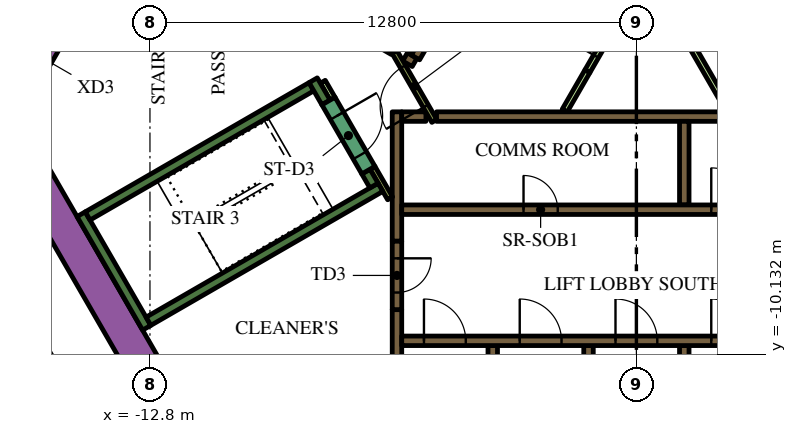
"""IFC4 building model, lengths in metres.
Left out: names, types, materials, properties, quantities, classifications, styles, units other than length and angle.
Written with IfcOpenShell. Run it as: python <this file> out.ifc"""

import sys

from ifc_helpers import new_model, si_unit, direction, frame, frame_2d, origin, place, context, subcontext, project, spatial, rectangle, extrude, element, fill, save


model = new_model("IFC4")
c1 = context("Model", 3, precision=1e-05, world=origin(), true_north=direction((0.0, 1.0)))
c2 = subcontext(c1, "Body", "Model", "MODEL_VIEW")
j1 = project(units=[si_unit("LENGTHUNIT", "METRE"), si_unit("PLANEANGLEUNIT", "RADIAN")], contexts=[c1])
p1 = place(None, origin())
s1 = spatial("IfcSite", under=j1, at=p1, CompositionType="ELEMENT")
p2 = place(p1, origin())
s2 = spatial("IfcBuilding", under=s1, at=p2, CompositionType="ELEMENT")
p3 = place(p2, frame((0.0, 0.0, 51.0)))
s3 = spatial("IfcBuildingStorey", under=s2, at=p3, CompositionType="ELEMENT", Elevation=51.0)
p4 = place(p3, frame((-12.134, -11.883, 0.0), z_axis=(0.0, 0.0, 1.0), x_axis=(-0.500005339912, 0.866022320763, 0.0)))
e1 = element("IfcWall", 1, at=p4, inside=s3, PredefinedType="SOLIDWALL", context=c2, shape_type="SweptSolid", body=[
    extrude(rectangle(XDim=9.488, YDim=0.9, at=frame_2d((4.744, 0.0))), origin(), (0.0, 0.0, 1.0), 3.9),
])
p5 = place(p3, frame((-12.885, -9.431, 0.0), z_axis=(0.0, 0.0, 1.0), x_axis=(-0.500020560727, 0.866013532718, 0.0)))
e2 = element("IfcWall", 2, at=p5, inside=s3, PredefinedType="SOLIDWALL", context=c2, shape_type="SweptSolid", body=[
    extrude(rectangle(XDim=3.45, YDim=0.25, at=frame_2d((1.725, 0.0))), origin(), (0.0, 0.0, 1.0), 3.9),
])
p6 = place(p3, frame((-14.44, -6.49, 0.0), z_axis=(0.0, 0.0, 1.0), x_axis=(0.866022966069, 0.500004222222, 0.0)))
e3 = element("IfcWall", 3, at=p6, inside=s3, PredefinedType="SOLIDWALL", context=c2, shape_type="SweptSolid", body=[
    extrude(rectangle(XDim=6.8, YDim=0.25, at=frame_2d((3.4, 0.0))), origin(), (0.0, 0.0, 1.0), 3.9),
])
p7 = place(p3, frame((-8.168, -3.503, 0.0), z_axis=(0.0, 0.0, 1.0), x_axis=(-0.499952099219, 0.866053057547, 0.0)))
e4 = element("IfcWall", 4, at=p7, inside=s3, PredefinedType="SOLIDWALL", context=c2, shape_type="SweptSolid", body=[
    extrude(rectangle(XDim=0.675, YDim=0.25, at=frame_2d((0.337, 0.0))), origin(), (0.0, 0.0, 1.0), 3.9),
])
p8 = place(p3, frame((-12.84, -9.261, 0.0), z_axis=(0.0, 0.0, 1.0), x_axis=(0.866016039709, 0.500016218704, 0.0)))
e5 = element("IfcWall", 5, at=p8, inside=s3, PredefinedType="SOLIDWALL", context=c2, shape_type="SweptSolid", body=[
    extrude(rectangle(XDim=7.05, YDim=0.25, at=frame_2d((3.525, 0.0))), origin(), (0.0, 0.0, 1.0), 3.9),
])
p9 = place(p3, frame((-6.905, -5.69, 0.0), z_axis=(0.0, 0.0, 1.0), x_axis=(-0.500402024738, 0.865793170242, 0.0)))
e6 = element("IfcWall", 6, at=p9, inside=s3, PredefinedType="SOLIDWALL", context=c2, shape_type="SweptSolid", body=[
    extrude(rectangle(XDim=0.425, YDim=0.25, at=frame_2d((0.212, 0.0))), origin(), (0.0, 0.0, 1.0), 3.9),
])
p10 = place(p3, frame((-3.78, -12.1, 0.0), z_axis=(0.0, 0.0, 1.0), x_axis=(0.0, 1.0, 0.0)))
e7 = element("IfcWall", 7, at=p10, inside=s3, PredefinedType="SOLIDWALL", context=c2, shape_type="SweptSolid", body=[
    extrude(rectangle(XDim=2.2, YDim=0.25, at=frame_2d((1.1, 0.0))), origin(), (0.0, 0.0, 1.0), 3.9),
])
p11 = place(p3, frame((-6.3, -12.1, 0.0), z_axis=(0.0, 0.0, 1.0), x_axis=(0.0, 1.0, 0.0)))
e8 = element("IfcWall", 8, at=p11, inside=s3, PredefinedType="SOLIDWALL", context=c2, shape_type="SweptSolid", body=[
    extrude(rectangle(XDim=3.146, YDim=0.25, at=frame_2d((1.573, 0.0))), origin(), (0.0, 0.0, 1.0), 3.9),
])
p12 = place(p3, frame((-5.259, -3.875, 0.0), z_axis=(0.0, 0.0, 1.0), x_axis=(1.0, 0.0, 0.0)))
e9 = element("IfcWall", 9, at=p12, inside=s3, PredefinedType="SOLIDWALL", context=c2, shape_type="SweptSolid", body=[
    extrude(rectangle(XDim=10.489, YDim=0.25, at=frame_2d((5.244, 0.0))), origin(), (0.0, 0.0, 1.0), 3.9),
])
p13 = place(p3, frame((1.26, -4.0, 0.0), z_axis=(0.0, 0.0, 1.0), x_axis=(0.0, -1.0, 0.0)))
e10 = element("IfcWall", 10, at=p13, inside=s3, PredefinedType="SOLIDWALL", context=c2, shape_type="SweptSolid", body=[
    extrude(rectangle(XDim=2.2, YDim=0.25, at=frame_2d((1.1, 0.0))), origin(), (0.0, 0.0, 1.0), 3.9),
])
p14 = place(p3, frame((-6.3, -3.75, 0.0), z_axis=(0.0, 0.0, 1.0), x_axis=(0.0, -1.0, 0.0)))
e11 = element("IfcWall", 11, at=p14, inside=s3, PredefinedType="SOLIDWALL", context=c2, shape_type="SweptSolid", body=[
    extrude(rectangle(XDim=3.404, YDim=0.25, at=frame_2d((1.702, 0.0))), origin(), (0.0, 0.0, 1.0), 3.9),
])
p15 = place(p3, frame((-6.175, -3.875, 0.0), z_axis=(0.0, 0.0, 1.0), x_axis=(1.0, 0.0, 0.0)))
e12 = element("IfcWall", 12, at=p15, inside=s3, PredefinedType="SOLIDWALL", context=c2, shape_type="SweptSolid", body=[
    extrude(rectangle(XDim=0.637, YDim=0.25, at=frame_2d((0.318, 0.0))), origin(), (0.0, 0.0, 1.0), 3.9),
])
for number, where, z_axis, x_axis in (
    (13, (1.26, -12.1, 0.0), (0.0, 0.0, 1.0), (0.0, 1.0, 0.0)),
    (14, (-1.26, -12.1, 0.0), (0.0, 0.0, 1.0), (0.0, 1.0, 0.0)),
):
    element("IfcWall", number, at=place(p3, frame(where, z_axis=z_axis, x_axis=x_axis)), inside=s3, PredefinedType="SOLIDWALL", context=c2, shape_type="SweptSolid", body=[
        extrude(rectangle(XDim=2.2, YDim=0.25, at=frame_2d((1.1, 0.0))), origin(), (0.0, 0.0, 1.0), 3.9),
    ])
p16 = place(p3, frame((5.97, -2.591, 0.0), z_axis=(0.0, 0.0, 1.0), x_axis=(-0.499994469932, 0.866028596547, 0.0)))
e15 = element("IfcWall", 15, at=p16, inside=s3, PredefinedType="SOLIDWALL", context=c2, shape_type="SweptSolid", body=[
    extrude(rectangle(XDim=10.488, YDim=0.25, at=frame_2d((5.244, 0.0))), origin(), (0.0, 0.0, 1.0), 3.9),
])
p17 = place(p3, frame((-6.088, -2.305, 0.0), z_axis=(0.0, 0.0, 1.0), x_axis=(0.866059450854, -0.499941024108, 0.0)))
e16 = element("IfcWall", 16, at=p17, inside=s3, PredefinedType="SOLIDWALL", context=c2, shape_type="SweptSolid", body=[
    extrude(rectangle(XDim=0.29, YDim=0.25, at=frame_2d((0.145, 0.0))), origin(), (0.0, 0.0, 1.0), 3.9),
])
p18 = place(p3, frame((-7.889, -1.265, 0.0), z_axis=(0.0, 0.0, 1.0), x_axis=(0.865986741702, -0.500066958712, 0.0)))
e17 = element("IfcWall", 17, at=p18, inside=s3, PredefinedType="SOLIDWALL", context=c2, shape_type="SweptSolid", body=[
    extrude(rectangle(XDim=1.738, YDim=0.25, at=frame_2d((0.869, 0.0))), origin(), (0.0, 0.0, 1.0), 3.9),
])
p19 = place(p3, frame((-6.48, -6.027, 0.0), z_axis=(0.0, 0.0, 1.0), x_axis=(-0.499927229454, 0.866067413802, 0.0)))
e18 = element("IfcWall", 18, at=p19, inside=s3, PredefinedType="PARTITIONING", context=c2, shape_type="SweptSolid", body=[
    extrude(rectangle(XDim=0.929, YDim=0.15, at=frame_2d((0.464, 0.0))), origin(), (0.0, 0.0, 1.0), 3.9),
])
p20 = place(p3, frame((-1.887, -3.718, 0.0), z_axis=(0.0, 0.0, 1.0), x_axis=(0.500057179532, 0.865992388649, 0.0)))
e19 = element("IfcWall", 19, at=p20, inside=s3, PredefinedType="PARTITIONING", context=c2, shape_type="SweptSolid", body=[
    extrude(rectangle(XDim=1.199, YDim=0.15, at=frame_2d((0.6, 0.0))), origin(), (0.0, 0.0, 1.0), 2.75),
])
p21 = place(p3, frame((-8.252, -2.958, 0.0), z_axis=(0.0, 0.0, 1.0), x_axis=(0.500174715838, -0.865924508047, 0.0)))
e20 = element("IfcWall", 20, at=p21, inside=s3, PredefinedType="PARTITIONING", context=c2, shape_type="SweptSolid", body=[
    extrude(rectangle(XDim=0.514, YDim=0.15, at=frame_2d((0.257, 0.0))), origin(), (0.0, 0.0, 1.0), 2.75),
])
p22 = place(p3, frame((2.435, -3.718, 0.0), z_axis=(0.0, 0.0, 1.0), x_axis=(-0.499985176046, 0.866033962229, 0.0)))
e21 = element("IfcWall", 21, at=p22, inside=s3, PredefinedType="PARTITIONING", context=c2, shape_type="SweptSolid", body=[
    extrude(rectangle(XDim=8.875, YDim=0.15, at=frame_2d((4.438, 0.0))), origin(), (0.0, 0.0, 1.0), 2.75),
])
p23 = place(p3, frame((-6.175, -9.775, 0.0), z_axis=(0.0, 0.0, 1.0), x_axis=(1.0, 0.0, 0.0)))
e22 = element("IfcWall", 22, at=p23, inside=s3, PredefinedType="SOLIDWALL", context=c2, shape_type="SweptSolid", body=[
    extrude(rectangle(XDim=12.35, YDim=0.25, at=frame_2d((6.175, 0.0))), origin(), (0.0, 0.0, 1.0), 3.9),
])
p24 = place(p23, frame((0.585, 0.0, 0.0)))
e23 = element("IfcOpeningElement", 23, at=p24, cuts=e22, PredefinedType="OPENING", context=c2, shape_type="SweptSolid", body=[
    extrude(rectangle(XDim=1.1, YDim=2.1, at=frame_2d((0.55, 1.05))), frame((0.0, 0.135, 0.0), z_axis=(0.0, -1.0, 0.0), x_axis=(1.0, 0.0, 0.0)), (0.0, 0.0, 1.0), 0.27),
])
p25 = place(p23, frame((3.105, 0.0, 0.0)))
e24 = element("IfcOpeningElement", 24, at=p25, cuts=e22, PredefinedType="OPENING", context=c2, shape_type="SweptSolid", body=[
    extrude(rectangle(XDim=1.1, YDim=2.1, at=frame_2d((0.55, 1.05))), frame((0.0, 0.135, 0.0), z_axis=(0.0, -1.0, 0.0), x_axis=(1.0, 0.0, 0.0)), (0.0, 0.0, 1.0), 0.27),
])
p26 = place(p23, frame((5.625, 0.0, 0.0)))
e25 = element("IfcOpeningElement", 25, at=p26, cuts=e22, PredefinedType="OPENING", context=c2, shape_type="SweptSolid", body=[
    extrude(rectangle(XDim=1.1, YDim=2.1, at=frame_2d((0.55, 1.05))), frame((0.0, 0.135, 0.0), z_axis=(0.0, -1.0, 0.0), x_axis=(1.0, 0.0, 0.0)), (0.0, 0.0, 1.0), 0.27),
])
p27 = place(p23, frame((8.145, 0.0, 0.0)))
e26 = element("IfcOpeningElement", 26, at=p27, cuts=e22, PredefinedType="OPENING", context=c2, shape_type="SweptSolid", body=[
    extrude(rectangle(XDim=1.1, YDim=2.1, at=frame_2d((0.55, 1.05))), frame((0.0, 0.135, 0.0), z_axis=(0.0, -1.0, 0.0), x_axis=(1.0, 0.0, 0.0)), (0.0, 0.0, 1.0), 0.27),
])
p28 = place(p23, frame((10.665, 0.0, 0.0)))
e27 = element("IfcOpeningElement", 27, at=p28, cuts=e22, PredefinedType="OPENING", context=c2, shape_type="SweptSolid", body=[
    extrude(rectangle(XDim=1.1, YDim=2.1, at=frame_2d((0.55, 1.05))), frame((0.0, 0.135, 0.0), z_axis=(0.0, -1.0, 0.0), x_axis=(1.0, 0.0, 0.0)), (0.0, 0.0, 1.0), 0.27),
])
p29 = place(p3, frame((-6.175, -6.325, 0.0), z_axis=(0.0, 0.0, 1.0), x_axis=(1.0, 0.0, 0.0)))
e28 = element("IfcWall", 28, at=p29, inside=s3, PredefinedType="SOLIDWALL", context=c2, shape_type="SweptSolid", body=[
    extrude(rectangle(XDim=12.35, YDim=0.25, at=frame_2d((6.175, 0.0))), origin(), (0.0, 0.0, 1.0), 3.9),
])
p30 = place(p29, frame((3.205, 0.0, 0.0)))
e29 = element("IfcOpeningElement", 29, at=p30, cuts=e28, PredefinedType="OPENING", context=c2, shape_type="SweptSolid", body=[
    extrude(rectangle(XDim=0.9, YDim=2.1, at=frame_2d((0.45, 1.05))), frame((0.0, 0.135, 0.0), z_axis=(0.0, -1.0, 0.0), x_axis=(1.0, 0.0, 0.0)), (0.0, 0.0, 1.0), 0.27),
])
p31 = place(p29, frame((8.145, 0.0, 0.0)))
e30 = element("IfcOpeningElement", 30, at=p31, cuts=e28, PredefinedType="OPENING", context=c2, shape_type="SweptSolid", body=[
    extrude(rectangle(XDim=1.1, YDim=2.1, at=frame_2d((0.55, 1.05))), frame((0.0, 0.135, 0.0), z_axis=(0.0, -1.0, 0.0), x_axis=(1.0, 0.0, 0.0)), (0.0, 0.0, 1.0), 0.27),
])
p32 = place(p29, frame((10.665, 0.0, 0.0)))
e31 = element("IfcOpeningElement", 31, at=p32, cuts=e28, PredefinedType="OPENING", context=c2, shape_type="SweptSolid", body=[
    extrude(rectangle(XDim=1.1, YDim=2.1, at=frame_2d((0.55, 1.05))), frame((0.0, 0.135, 0.0), z_axis=(0.0, -1.0, 0.0), x_axis=(1.0, 0.0, 0.0)), (0.0, 0.0, 1.0), 0.27),
])
p33 = place(p3, frame((-0.898, 6.194, 0.0), z_axis=(0.0, 0.0, 1.0), x_axis=(-0.499996202215, -0.866027596426, 0.0)))
e32 = element("IfcWall", 32, at=p33, inside=s3, PredefinedType="SOLIDWALL", context=c2, shape_type="SweptSolid", body=[
    extrude(rectangle(XDim=9.83, YDim=0.25, at=frame_2d((4.915, 0.0))), origin(), (0.0, 0.0, 1.0), 3.9),
])
p34 = place(p33, frame((0.585, 0.0, 0.0)))
e33 = element("IfcOpeningElement", 33, at=p34, cuts=e32, PredefinedType="OPENING", context=c2, shape_type="SweptSolid", body=[
    extrude(rectangle(XDim=1.1, YDim=2.1, at=frame_2d((0.55, 1.05))), frame((0.0, 0.135, 0.0), z_axis=(0.0, -1.0, 0.0), x_axis=(1.0, 0.0, 0.0)), (0.0, 0.0, 1.0), 0.27),
])
p35 = place(p33, frame((3.105, 0.0, 0.0)))
e34 = element("IfcOpeningElement", 34, at=p35, cuts=e32, PredefinedType="OPENING", context=c2, shape_type="SweptSolid", body=[
    extrude(rectangle(XDim=1.1, YDim=2.1, at=frame_2d((0.55, 1.05))), frame((0.0, 0.135, 0.0), z_axis=(0.0, -1.0, 0.0), x_axis=(1.0, 0.0, 0.0)), (0.0, 0.0, 1.0), 0.27),
])
p36 = place(p33, frame((5.625, 0.0, 0.0)))
e35 = element("IfcOpeningElement", 35, at=p36, cuts=e32, PredefinedType="OPENING", context=c2, shape_type="SweptSolid", body=[
    extrude(rectangle(XDim=1.1, YDim=2.1, at=frame_2d((0.55, 1.05))), frame((0.0, 0.135, 0.0), z_axis=(0.0, -1.0, 0.0), x_axis=(1.0, 0.0, 0.0)), (0.0, 0.0, 1.0), 0.27),
])
p37 = place(p33, frame((8.145, 0.0, 0.0)))
e36 = element("IfcOpeningElement", 36, at=p37, cuts=e32, PredefinedType="OPENING", context=c2, shape_type="SweptSolid", body=[
    extrude(rectangle(XDim=1.1, YDim=2.1, at=frame_2d((0.55, 1.05))), frame((0.0, 0.135, 0.0), z_axis=(0.0, -1.0, 0.0), x_axis=(1.0, 0.0, 0.0)), (0.0, 0.0, 1.0), 0.27),
])
p38 = place(p3, frame((-8.103, -3.466, 0.0), z_axis=(0.0, 0.0, 1.0), x_axis=(0.500078061341, -0.865980330357, 0.0)))
e37 = element("IfcWall", 37, at=p38, inside=s3, PredefinedType="SOLIDWALL", context=c2, shape_type="SweptSolid", body=[
    extrude(rectangle(XDim=2.1, YDim=0.4, at=frame_2d((1.05, 0.0))), origin(), (0.0, 0.0, 1.0), 3.9),
])
p39 = place(p38, frame((0.45, 0.0, 0.0)))
e38 = element("IfcOpeningElement", 38, at=p39, cuts=e37, PredefinedType="OPENING", context=c2, shape_type="SweptSolid", body=[
    extrude(rectangle(XDim=1.2, YDim=2.1, at=frame_2d((0.6, 1.05))), frame((0.0, 0.21, 0.0), z_axis=(0.0, -1.0, 0.0), x_axis=(1.0, 0.0, 0.0)), (0.0, 0.0, 1.0), 0.42),
])
p40 = place(p3, frame((-6.3, -7.154, 0.0), z_axis=(0.0, 0.0, 1.0), x_axis=(0.0, -1.0, 0.0)))
e39 = element("IfcWall", 39, at=p40, inside=s3, PredefinedType="SOLIDWALL", context=c2, shape_type="SweptSolid", body=[
    extrude(rectangle(XDim=1.8, YDim=0.25, at=frame_2d((0.9, 0.0))), origin(), (0.0, 0.0, 1.0), 3.9),
])
p41 = place(p40, frame((0.45, 0.0, 0.0)))
e40 = element("IfcOpeningElement", 40, at=p41, cuts=e39, PredefinedType="OPENING", context=c2, shape_type="SweptSolid", body=[
    extrude(rectangle(XDim=0.9, YDim=2.1, at=frame_2d((0.45, 1.05))), frame((0.0, 0.135, 0.0), z_axis=(0.0, -1.0, 0.0), x_axis=(1.0, 0.0, 0.0)), (0.0, 0.0, 1.0), 0.27),
])
p42 = place(p3, frame((-5.317, -3.99, 0.0), z_axis=(0.0, 0.0, 1.0), x_axis=(-0.500027713859, 0.866009402589, 0.0)))
e41 = element("IfcWall", 41, at=p42, inside=s3, PredefinedType="PARTITIONING", context=c2, shape_type="SweptSolid", body=[
    extrude(rectangle(XDim=2.1, YDim=0.15, at=frame_2d((1.05, 0.0))), origin(), (0.0, 0.0, 1.0), 3.9),
])
p43 = place(p42, frame((0.45, 0.0, 0.0)))
e42 = element("IfcOpeningElement", 42, at=p43, cuts=e41, PredefinedType="OPENING", context=c2, shape_type="SweptSolid", body=[
    extrude(rectangle(XDim=1.2, YDim=2.1, at=frame_2d((0.6, 1.05))), frame((0.0, 0.085, 0.0), z_axis=(0.0, -1.0, 0.0), x_axis=(1.0, 0.0, 0.0)), (0.0, 0.0, 1.0), 0.17),
])
p44 = place(p3, frame((-16.209, -2.976, 0.0), z_axis=(0.0, 0.0, 1.0), x_axis=(0.499954529098, 0.86605165483, 0.0)))
e43 = element("IfcWall", 43, at=p44, inside=s3, PredefinedType="SOLIDWALL", context=c2, shape_type="SweptSolid", body=[
    extrude(rectangle(XDim=1.7, YDim=0.9, at=frame_2d((0.85, 0.0))), origin(), (0.0, 0.0, 1.0), 3.9),
])
p45 = place(p44, frame((0.25, 0.0, 0.0)))
e44 = element("IfcOpeningElement", 44, at=p45, cuts=e43, PredefinedType="OPENING", context=c2, shape_type="SweptSolid", body=[
    extrude(rectangle(XDim=1.2, YDim=2.1, at=frame_2d((0.6, 1.05))), frame((0.0, 0.46, 0.0), z_axis=(0.0, -1.0, 0.0), x_axis=(1.0, 0.0, 0.0)), (0.0, 0.0, 1.0), 0.92),
])
p46 = place(p3, frame((-1.287, -2.679, 0.0), z_axis=(0.0, 0.0, 1.0), x_axis=(0.499961193289, 0.866047807691, 0.0)))
e45 = element("IfcWall", 45, at=p46, inside=s3, PredefinedType="PARTITIONING", context=c2, shape_type="SweptSolid", body=[
    extrude(rectangle(XDim=1.8, YDim=0.15, at=frame_2d((0.9, 0.0))), origin(), (0.0, 0.0, 1.0), 2.75),
])
p47 = place(p46, frame((0.45, 0.0, 0.0)))
e46 = element("IfcOpeningElement", 46, at=p47, cuts=e45, PredefinedType="OPENING", context=c2, shape_type="SweptSolid", body=[
    extrude(rectangle(XDim=0.9, YDim=2.1, at=frame_2d((0.45, 1.05))), frame((0.0, 0.085, 0.0), z_axis=(0.0, -1.0, 0.0), x_axis=(1.0, 0.0, 0.0)), (0.0, 0.0, 1.0), 0.17),
])
p48 = place(p3, frame((-19.081, -3.9, 0.0), z_axis=(0.0, 0.0, 1.0), x_axis=(0.499998313975, 0.866026377209, 0.0)))
e47 = element("IfcWall", 47, at=p48, inside=s3, PredefinedType="PARTITIONING", context=c2, shape_type="SweptSolid", body=[
    extrude(rectangle(XDim=25.766, YDim=0.15, at=frame_2d((12.883, 0.0))), origin(), (0.0, 0.0, 1.0), 2.75),
])
p49 = place(p48, frame((22.445, 0.0, 0.0)))
e48 = element("IfcOpeningElement", 48, at=p49, cuts=e47, PredefinedType="OPENING", context=c2, shape_type="SweptSolid", body=[
    extrude(rectangle(XDim=1.0, YDim=2.1, at=frame_2d((0.5, 1.05))), frame((0.0, 0.085, 0.0), z_axis=(0.0, -1.0, 0.0), x_axis=(1.0, 0.0, 0.0)), (0.0, 0.0, 1.0), 0.17),
])
p50 = place(p48, frame((21.138, 0.0, 0.0)))
e49 = element("IfcOpeningElement", 49, at=p50, cuts=e47, PredefinedType="OPENING", context=c2, shape_type="SweptSolid", body=[
    extrude(rectangle(XDim=1.0, YDim=2.1, at=frame_2d((0.5, 1.05))), frame((0.0, 0.085, 0.0), z_axis=(0.0, -1.0, 0.0), x_axis=(1.0, 0.0, 0.0)), (0.0, 0.0, 1.0), 0.17),
])
p51 = place(p48, frame((14.066, 0.0, 0.0)))
e50 = element("IfcOpeningElement", 50, at=p51, cuts=e47, PredefinedType="OPENING", context=c2, shape_type="SweptSolid", body=[
    extrude(rectangle(XDim=0.9, YDim=2.1, at=frame_2d((0.45, 1.05))), frame((0.0, 0.085, 0.0), z_axis=(0.0, -1.0, 0.0), x_axis=(1.0, 0.0, 0.0)), (0.0, 0.0, 1.0), 0.17),
])
p52 = place(p48, frame((11.693, 0.0, 0.0)))
e51 = element("IfcOpeningElement", 51, at=p52, cuts=e47, PredefinedType="OPENING", context=c2, shape_type="SweptSolid", body=[
    extrude(rectangle(XDim=1.0, YDim=2.1, at=frame_2d((0.5, 1.05))), frame((0.0, 0.085, 0.0), z_axis=(0.0, -1.0, 0.0), x_axis=(1.0, 0.0, 0.0)), (0.0, 0.0, 1.0), 0.17),
])
p53 = place(p3, frame((-12.918, -14.575, 0.0), z_axis=(0.0, 0.0, 1.0), x_axis=(-0.500009150678, 0.866020120573, 0.0)))
e52 = element("IfcWall", 52, at=p53, inside=s3, PredefinedType="PARTITIONING", context=c2, shape_type="SweptSolid", body=[
    extrude(rectangle(XDim=5.258, YDim=0.15, at=frame_2d((2.629, 0.0))), origin(), (0.0, 0.0, 1.0), 2.75),
])
p54 = place(p24, origin())
e53 = element("IfcDoor", 53, at=p54, inside=s3, OperationType="DOUBLE_DOOR_SLIDING", PredefinedType="DOOR", context=c2, shape_type="SweptSolid", body=[
    extrude(rectangle(XDim=1.1, YDim=2.1, at=frame_2d((0.55, 1.05))), frame((0.0, 0.025, 0.0), z_axis=(0.0, -1.0, 0.0), x_axis=(1.0, 0.0, 0.0)), (0.0, 0.0, 1.0), 0.05),
])
fill(e23, e53)
p55 = place(p25, origin())
e54 = element("IfcDoor", 54, at=p55, inside=s3, OperationType="DOUBLE_DOOR_SLIDING", PredefinedType="DOOR", context=c2, shape_type="SweptSolid", body=[
    extrude(rectangle(XDim=1.1, YDim=2.1, at=frame_2d((0.55, 1.05))), frame((0.0, 0.025, 0.0), z_axis=(0.0, -1.0, 0.0), x_axis=(1.0, 0.0, 0.0)), (0.0, 0.0, 1.0), 0.05),
])
fill(e24, e54)
p56 = place(p26, origin())
e55 = element("IfcDoor", 55, at=p56, inside=s3, OperationType="DOUBLE_DOOR_SLIDING", PredefinedType="DOOR", context=c2, shape_type="SweptSolid", body=[
    extrude(rectangle(XDim=1.1, YDim=2.1, at=frame_2d((0.55, 1.05))), frame((0.0, 0.025, 0.0), z_axis=(0.0, -1.0, 0.0), x_axis=(1.0, 0.0, 0.0)), (0.0, 0.0, 1.0), 0.05),
])
fill(e25, e55)
p57 = place(p27, origin())
e56 = element("IfcDoor", 56, at=p57, inside=s3, OperationType="DOUBLE_DOOR_SLIDING", PredefinedType="DOOR", context=c2, shape_type="SweptSolid", body=[
    extrude(rectangle(XDim=1.1, YDim=2.1, at=frame_2d((0.55, 1.05))), frame((0.0, 0.025, 0.0), z_axis=(0.0, -1.0, 0.0), x_axis=(1.0, 0.0, 0.0)), (0.0, 0.0, 1.0), 0.05),
])
fill(e26, e56)
p58 = place(p30, origin())
e57 = element("IfcDoor", 57, at=p58, inside=s3, OperationType="SINGLE_SWING_LEFT", PredefinedType="DOOR", context=c2, shape_type="SweptSolid", body=[
    extrude(rectangle(XDim=0.9, YDim=2.1, at=frame_2d((0.45, 1.05))), frame((0.0, 0.025, 0.0), z_axis=(0.0, -1.0, 0.0), x_axis=(1.0, 0.0, 0.0)), (0.0, 0.0, 1.0), 0.05),
])
fill(e29, e57)
p59 = place(p31, origin())
e58 = element("IfcDoor", 58, at=p59, inside=s3, OperationType="DOUBLE_DOOR_SLIDING", PredefinedType="DOOR", context=c2, shape_type="SweptSolid", body=[
    extrude(rectangle(XDim=1.1, YDim=2.1, at=frame_2d((0.55, 1.05))), frame((0.0, 0.025, 0.0), z_axis=(0.0, -1.0, 0.0), x_axis=(1.0, 0.0, 0.0)), (0.0, 0.0, 1.0), 0.05),
])
fill(e30, e58)
p60 = place(p39, origin())
e59 = element("IfcDoor", 59, at=p60, inside=s3, OperationType="SINGLE_SWING_LEFT", PredefinedType="DOOR", context=c2, shape_type="SweptSolid", body=[
    extrude(rectangle(XDim=1.2, YDim=2.1, at=frame_2d((0.6, 1.05))), frame((0.0, 0.025, 0.0), z_axis=(0.0, -1.0, 0.0), x_axis=(1.0, 0.0, 0.0)), (0.0, 0.0, 1.0), 0.05),
])
fill(e38, e59)
p61 = place(p41, origin())
e60 = element("IfcDoor", 60, at=p61, inside=s3, OperationType="SINGLE_SWING_LEFT", PredefinedType="DOOR", context=c2, shape_type="SweptSolid", body=[
    extrude(rectangle(XDim=0.9, YDim=2.1, at=frame_2d((0.45, 1.05))), frame((0.0, 0.025, 0.0), z_axis=(0.0, -1.0, 0.0), x_axis=(1.0, 0.0, 0.0)), (0.0, 0.0, 1.0), 0.05),
])
fill(e40, e60)
p62 = place(p43, origin())
e61 = element("IfcDoor", 61, at=p62, inside=s3, OperationType="SINGLE_SWING_LEFT", PredefinedType="DOOR", context=c2, shape_type="SweptSolid", body=[
    extrude(rectangle(XDim=1.2, YDim=2.1, at=frame_2d((0.6, 1.05))), frame((0.0, 0.025, 0.0), z_axis=(0.0, -1.0, 0.0), x_axis=(1.0, 0.0, 0.0)), (0.0, 0.0, 1.0), 0.05),
])
fill(e42, e61)
p63 = place(p47, origin())
e62 = element("IfcDoor", 62, at=p63, inside=s3, OperationType="SINGLE_SWING_LEFT", PredefinedType="DOOR", context=c2, shape_type="SweptSolid", body=[
    extrude(rectangle(XDim=0.9, YDim=2.1, at=frame_2d((0.45, 1.05))), frame((0.0, 0.025, 0.0), z_axis=(0.0, -1.0, 0.0), x_axis=(1.0, 0.0, 0.0)), (0.0, 0.0, 1.0), 0.05),
])
fill(e46, e62)
save(model, sys.argv[1])
